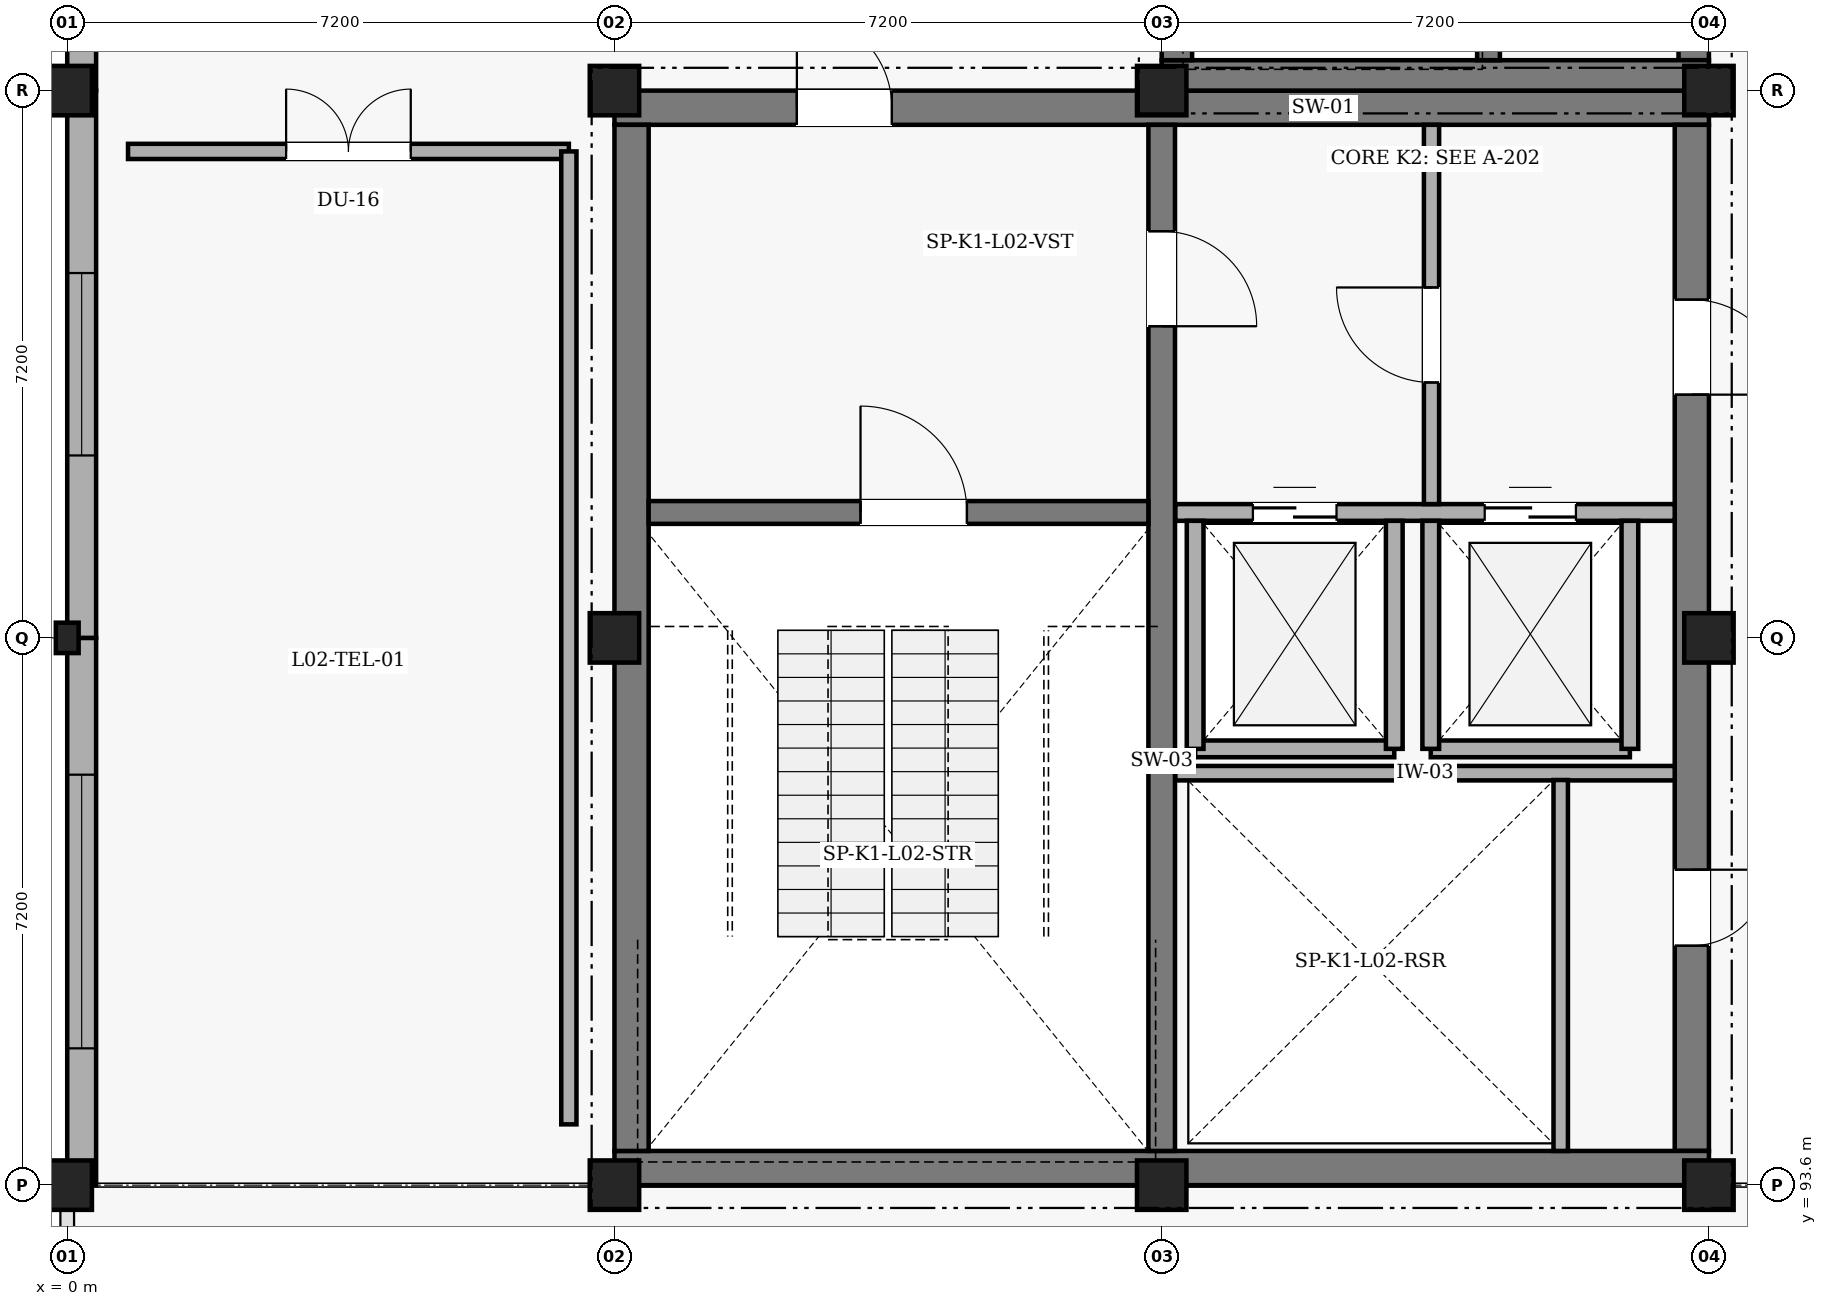
"""IFC4 building model, lengths in metres.
Left out: names, types, materials, properties, quantities, classifications, styles, units other than length and angle.
Written with IfcOpenShell. Run it as: python <this file> out.ifc"""

import sys

from ifc_helpers import new_model, si_unit, direction, frame, frame_2d, origin, origin_2d, place, context, subcontext, project, spatial, rectangle, extrude, element, fill, save


model = new_model("IFC4")
c1 = context("Model", 3, precision=1e-05, world=origin(), true_north=direction((0.0, 1.0)))
c2 = subcontext(c1, "Body", "Model", "MODEL_VIEW")
j1 = project(units=[si_unit("LENGTHUNIT", "METRE"), si_unit("PLANEANGLEUNIT", "RADIAN")], contexts=[c1])
p1 = place(None, origin())
s1 = spatial("IfcSite", under=j1, at=p1, CompositionType="ELEMENT")
p2 = place(p1, origin())
s2 = spatial("IfcBuilding", under=s1, at=p2, CompositionType="ELEMENT")
p3 = place(p2, frame((0.0, 0.0, 9.6)))
s3 = spatial("IfcBuildingStorey", under=s2, at=p3, CompositionType="ELEMENT", Elevation=9.6)
p4 = place(p3, frame((7.2, 107.775, 0.0), z_axis=(0.0, 0.0, 1.0), x_axis=(1.0, 0.0, 0.0)))
e1 = element("IfcWall", 1, at=p4, inside=s3, PredefinedType="SHEAR", context=c2, shape_type="SweptSolid", body=[
    extrude(rectangle(XDim=14.4, YDim=0.45, at=frame_2d((7.2, 0.0))), origin(), (0.0, 0.0, 1.0), 4.2),
])
p5 = place(p4, frame((2.4, 0.0, 0.0)))
e2 = element("IfcOpeningElement", 2, at=p5, cuts=e1, PredefinedType="OPENING", context=c2, shape_type="SweptSolid", body=[
    extrude(rectangle(XDim=1.25, YDim=2.2, at=frame_2d((0.625, 1.1))), frame((0.0, 0.235, 0.0), z_axis=(0.0, -1.0, 0.0), x_axis=(1.0, 0.0, 0.0)), (0.0, 0.0, 1.0), 0.47),
])
p6 = place(p3, frame((21.375, 107.55, 0.0), z_axis=(0.0, 0.0, 1.0), x_axis=(0.0, -1.0, 0.0)))
e3 = element("IfcWall", 3, at=p6, inside=s3, PredefinedType="SHEAR", context=c2, shape_type="SweptSolid", body=[
    extrude(rectangle(XDim=13.5, YDim=0.45, at=frame_2d((6.75, 0.0))), origin(), (0.0, 0.0, 1.0), 4.2),
])
p7 = place(p6, frame((9.8, 0.0, 0.0)))
e4 = element("IfcOpeningElement", 4, at=p7, cuts=e3, PredefinedType="OPENING", context=c2, shape_type="SweptSolid", body=[
    extrude(rectangle(XDim=1.0, YDim=2.15, at=frame_2d((0.5, 1.075))), frame((0.0, 0.235, 0.0), z_axis=(0.0, -1.0, 0.0), x_axis=(1.0, 0.0, 0.0)), (0.0, 0.0, 1.0), 0.47),
])
p8 = place(p6, frame((2.3, 0.0, 0.0)))
e5 = element("IfcOpeningElement", 5, at=p8, cuts=e3, PredefinedType="OPENING", context=c2, shape_type="SweptSolid", body=[
    extrude(rectangle(XDim=1.25, YDim=2.2, at=frame_2d((0.625, 1.1))), frame((0.0, 0.235, 0.0), z_axis=(0.0, -1.0, 0.0), x_axis=(1.0, 0.0, 0.0)), (0.0, 0.0, 1.0), 0.47),
])
p9 = place(p3, frame((21.6, 93.825, 0.0), z_axis=(0.0, 0.0, 1.0), x_axis=(-1.0, 0.0, 0.0)))
e6 = element("IfcWall", 6, at=p9, inside=s3, PredefinedType="SHEAR", context=c2, shape_type="SweptSolid", body=[
    extrude(rectangle(XDim=14.4, YDim=0.45, at=frame_2d((7.2, 0.0))), origin(), (0.0, 0.0, 1.0), 4.2),
])
p10 = place(p3, frame((7.425, 94.05, 0.0), z_axis=(0.0, 0.0, 1.0), x_axis=(0.0, 1.0, 0.0)))
e7 = element("IfcWall", 7, at=p10, inside=s3, PredefinedType="SHEAR", context=c2, shape_type="SweptSolid", body=[
    extrude(rectangle(XDim=13.5, YDim=0.45, at=frame_2d((6.75, 0.0))), origin(), (0.0, 0.0, 1.0), 4.2),
])
p11 = place(p3, frame((14.4, 107.55, 0.0), z_axis=(0.0, 0.0, 1.0), x_axis=(0.0, -1.0, 0.0)))
e8 = element("IfcWall", 8, at=p11, inside=s3, PredefinedType="SHEAR", context=c2, shape_type="SweptSolid", body=[
    extrude(rectangle(XDim=13.5, YDim=0.35, at=frame_2d((6.75, 0.0))), origin(), (0.0, 0.0, 1.0), 4.2),
])
p12 = place(p11, frame((1.4, 0.0, 0.0)))
e9 = element("IfcOpeningElement", 9, at=p12, cuts=e8, PredefinedType="OPENING", context=c2, shape_type="SweptSolid", body=[
    extrude(rectangle(XDim=1.25, YDim=2.2, at=frame_2d((0.625, 1.1))), frame((0.0, 0.185, 0.0), z_axis=(0.0, -1.0, 0.0), x_axis=(1.0, 0.0, 0.0)), (0.0, 0.0, 1.0), 0.37),
])
p13 = place(p3, frame((7.65, 102.45, 0.0), z_axis=(0.0, 0.0, 1.0), x_axis=(1.0, 0.0, 0.0)))
e10 = element("IfcWall", 10, at=p13, inside=s3, PredefinedType="SHEAR", context=c2, shape_type="SweptSolid", body=[
    extrude(rectangle(XDim=6.575, YDim=0.3, at=frame_2d((3.288, 0.0))), origin(), (0.0, 0.0, 1.0), 4.2),
])
p14 = place(p13, frame((2.788, 0.0, 0.0)))
e11 = element("IfcOpeningElement", 11, at=p14, cuts=e10, PredefinedType="OPENING", context=c2, shape_type="SweptSolid", body=[
    extrude(rectangle(XDim=1.4, YDim=2.2, at=frame_2d((0.7, 1.1))), frame((0.0, 0.16, 0.0), z_axis=(0.0, -1.0, 0.0), x_axis=(1.0, 0.0, 0.0)), (0.0, 0.0, 1.0), 0.32),
])
p15 = place(p3, frame((21.4, 122.0, 0.0), z_axis=(0.0, 0.0, 1.0), x_axis=(0.0, -1.0, 0.0)))
e12 = element("IfcWall", 12, at=p15, inside=s3, PredefinedType="SHEAR", context=c2, shape_type="SweptSolid", body=[
    extrude(rectangle(XDim=13.6, YDim=0.4, at=frame_2d((6.8, 0.0))), origin(), (0.0, 0.0, 1.0), 4.2),
])
p16 = place(p15, frame((2.3, 0.0, 0.0)))
e13 = element("IfcOpeningElement", 13, at=p16, cuts=e12, PredefinedType="OPENING", context=c2, shape_type="SweptSolid", body=[
    extrude(rectangle(XDim=1.25, YDim=2.2, at=frame_2d((0.625, 1.1))), frame((0.0, 0.21, 0.0), z_axis=(0.0, -1.0, 0.0), x_axis=(1.0, 0.0, 0.0)), (0.0, 0.0, 1.0), 0.42),
])
p17 = place(p3, frame((21.6, 108.2, 0.0), z_axis=(0.0, 0.0, 1.0), x_axis=(-1.0, 0.0, 0.0)))
e14 = element("IfcWall", 14, at=p17, inside=s3, PredefinedType="SHEAR", context=c2, shape_type="SweptSolid", body=[
    extrude(rectangle(XDim=7.2, YDim=0.4, at=frame_2d((3.6, 0.0))), origin(), (0.0, 0.0, 1.0), 4.2),
])
p18 = place(p3, frame((14.6, 108.4, 0.0), z_axis=(0.0, 0.0, 1.0), x_axis=(0.0, 1.0, 0.0)))
e15 = element("IfcWall", 15, at=p18, inside=s3, PredefinedType="SHEAR", context=c2, shape_type="SweptSolid", body=[
    extrude(rectangle(XDim=13.6, YDim=0.4, at=frame_2d((6.8, 0.0))), origin(), (0.0, 0.0, 1.0), 4.2),
])
p19 = place(p18, frame((9.8, 0.0, 0.0)))
e16 = element("IfcOpeningElement", 16, at=p19, cuts=e15, PredefinedType="OPENING", context=c2, shape_type="SweptSolid", body=[
    extrude(rectangle(XDim=1.25, YDim=2.2, at=frame_2d((0.625, 1.1))), frame((0.0, 0.21, 0.0), z_axis=(0.0, -1.0, 0.0), x_axis=(1.0, 0.0, 0.0)), (0.0, 0.0, 1.0), 0.42),
])
p20 = place(p3, frame((18.7, 116.7, 0.0), z_axis=(0.0, 0.0, 1.0), x_axis=(0.0, -1.0, 0.0)))
e17 = element("IfcWall", 17, at=p20, inside=s3, PredefinedType="SHEAR", context=c2, shape_type="SweptSolid", body=[
    extrude(rectangle(XDim=8.3, YDim=0.3, at=frame_2d((4.15, 0.0))), origin(), (0.0, 0.0, 1.0), 4.2),
])
p21 = place(p3, frame((0.0, 93.6, 0.0), z_axis=(0.0, 0.0, 1.0), x_axis=(0.0, 1.0, 0.0)))
e18 = element("IfcColumn", 18, at=p21, inside=s3, PredefinedType="COLUMN", context=c2, shape_type="SweptSolid", body=[
    extrude(rectangle(XDim=0.65, YDim=0.65, at=origin_2d()), origin(), (0.0, 0.0, 1.0), 3.88),
])
p22 = place(p3, frame((0.0, 100.8, 0.0), z_axis=(0.0, 0.0, 1.0), x_axis=(1.0, 0.0, 0.0)))
e19 = element("IfcColumn", 19, at=p22, inside=s3, PredefinedType="PILASTER", context=c2, shape_type="SweptSolid", body=[
    extrude(rectangle(XDim=0.3, YDim=0.4, at=origin_2d()), origin(), (0.0, 0.0, 1.0), 3.88),
])
for number, where, z_axis, x_axis in (
    (20, (0.0, 108.0, 0.0), (0.0, 0.0, 1.0), (1.0, 0.0, 0.0)),
    (21, (7.2, 93.6, 0.0), (0.0, 0.0, 1.0), (1.0, 0.0, 0.0)),
    (22, (7.2, 100.8, 0.0), (0.0, 0.0, 1.0), (1.0, 0.0, 0.0)),
    (23, (7.2, 108.0, 0.0), (0.0, 0.0, 1.0), (1.0, 0.0, 0.0)),
    (24, (14.4, 93.6, 0.0), (0.0, 0.0, 1.0), (1.0, 0.0, 0.0)),
    (25, (14.4, 108.0, 0.0), (0.0, 0.0, 1.0), (1.0, 0.0, 0.0)),
    (26, (21.6, 93.6, 0.0), (0.0, 0.0, 1.0), (1.0, 0.0, 0.0)),
    (27, (21.6, 100.8, 0.0), (0.0, 0.0, 1.0), (1.0, 0.0, 0.0)),
    (28, (21.6, 108.0, 0.0), (0.0, 0.0, 1.0), (1.0, 0.0, 0.0)),
):
    element("IfcColumn", number, at=place(p3, frame(where, z_axis=z_axis, x_axis=x_axis)), inside=s3, PredefinedType="COLUMN", context=c2, shape_type="SweptSolid", body=[
        extrude(rectangle(XDim=0.65, YDim=0.65, at=origin_2d()), origin(), (0.0, 0.0, 1.0), 3.88),
    ])
p23 = place(p3, frame((0.19, 93.6, 0.0), z_axis=(0.0, 0.0, 1.0), x_axis=(0.0, 1.0, 0.0)))
e29 = element("IfcWall", 29, at=p23, inside=s3, PredefinedType="SOLIDWALL", context=c2, shape_type="SweptSolid", body=[
    extrude(rectangle(XDim=7.2, YDim=0.38, at=frame_2d((3.6, 0.0))), origin(), (0.0, 0.0, 1.0), 3.58),
])
p24 = place(p23, frame((1.8, 0.0, 0.9)))
e30 = element("IfcOpeningElement", 30, at=p24, cuts=e29, PredefinedType="OPENING", context=c2, shape_type="SweptSolid", body=[
    extrude(rectangle(XDim=3.6, YDim=1.1, at=frame_2d((1.8, 0.55))), frame((0.0, 0.2, 0.0), z_axis=(0.0, -1.0, 0.0), x_axis=(1.0, 0.0, 0.0)), (0.0, 0.0, 1.0), 0.4),
])
p25 = place(p3, frame((0.19, 100.8, 0.0), z_axis=(0.0, 0.0, 1.0), x_axis=(0.0, 1.0, 0.0)))
e31 = element("IfcWall", 31, at=p25, inside=s3, PredefinedType="SOLIDWALL", context=c2, shape_type="SweptSolid", body=[
    extrude(rectangle(XDim=7.2, YDim=0.38, at=frame_2d((3.6, 0.0))), origin(), (0.0, 0.0, 1.0), 3.58),
])
p26 = place(p25, frame((2.4, 0.0, 0.9)))
e32 = element("IfcOpeningElement", 32, at=p26, cuts=e31, PredefinedType="OPENING", context=c2, shape_type="SweptSolid", body=[
    extrude(rectangle(XDim=2.4, YDim=1.0, at=frame_2d((1.2, 0.5))), frame((0.0, 0.2, 0.0), z_axis=(0.0, -1.0, 0.0), x_axis=(1.0, 0.0, 0.0)), (0.0, 0.0, 1.0), 0.4),
])
p27 = place(p3, frame((0.19, 108.0, 0.0), z_axis=(0.0, 0.0, 1.0), x_axis=(0.0, 1.0, 0.0)))
e33 = element("IfcWall", 33, at=p27, inside=s3, PredefinedType="SOLIDWALL", context=c2, shape_type="SweptSolid", body=[
    extrude(rectangle(XDim=7.2, YDim=0.38, at=frame_2d((3.6, 0.0))), origin(), (0.0, 0.0, 1.0), 3.58),
])
p28 = place(p27, frame((2.55, 0.0, 0.9)))
e34 = element("IfcOpeningElement", 34, at=p28, cuts=e33, PredefinedType="OPENING", context=c2, shape_type="SweptSolid", body=[
    extrude(rectangle(XDim=2.1, YDim=1.8, at=frame_2d((1.05, 0.9))), frame((0.0, 0.2, 0.0), z_axis=(0.0, -1.0, 0.0), x_axis=(1.0, 0.0, 0.0)), (0.0, 0.0, 1.0), 0.4),
])
p29 = place(p3, frame((14.58, 99.02, 0.0), z_axis=(0.0, 0.0, 1.0), x_axis=(1.0, 0.0, 0.0)))
e35 = element("IfcWall", 35, at=p29, inside=s3, PredefinedType="PARTITIONING", context=c2, shape_type="SweptSolid", body=[
    extrude(rectangle(XDim=6.57, YDim=0.19, at=frame_2d((3.285, 0.0))), origin(), (0.0, 0.0, 1.0), 3.85),
])
p30 = place(p3, frame((19.65, 94.05, 0.0), z_axis=(0.0, 0.0, 1.0), x_axis=(0.0, 1.0, 0.0)))
e36 = element("IfcWall", 36, at=p30, inside=s3, PredefinedType="PARTITIONING", context=c2, shape_type="SweptSolid", body=[
    extrude(rectangle(XDim=4.88, YDim=0.19, at=frame_2d((2.44, 0.0))), origin(), (0.0, 0.0, 1.0), 3.85),
])
p31 = place(p3, frame((14.58, 102.45, 0.0), z_axis=(0.0, 0.0, 1.0), x_axis=(1.0, 0.0, 0.0)))
e37 = element("IfcWall", 37, at=p31, inside=s3, PredefinedType="PARTITIONING", context=c2, shape_type="SweptSolid", body=[
    extrude(rectangle(XDim=6.57, YDim=0.22, at=frame_2d((3.285, 0.0))), origin(), (0.0, 0.0, 1.0), 3.85),
])
p32 = place(p31, frame((1.02, 0.0, 0.0)))
e38 = element("IfcOpeningElement", 38, at=p32, cuts=e37, PredefinedType="OPENING", context=c2, shape_type="SweptSolid", body=[
    extrude(rectangle(XDim=1.1, YDim=2.15, at=frame_2d((0.55, 1.075))), frame((0.0, 0.12, 0.0), z_axis=(0.0, -1.0, 0.0), x_axis=(1.0, 0.0, 0.0)), (0.0, 0.0, 1.0), 0.24),
])
p33 = place(p31, frame((4.07, 0.0, 0.0)))
e39 = element("IfcOpeningElement", 39, at=p33, cuts=e37, PredefinedType="OPENING", context=c2, shape_type="SweptSolid", body=[
    extrude(rectangle(XDim=1.2, YDim=2.15, at=frame_2d((0.6, 1.075))), frame((0.0, 0.12, 0.0), z_axis=(0.0, -1.0, 0.0), x_axis=(1.0, 0.0, 0.0)), (0.0, 0.0, 1.0), 0.24),
])
p34 = place(p3, frame((14.84, 99.34, 0.0), z_axis=(0.0, 0.0, 1.0), x_axis=(1.0, 0.0, 0.0)))
e40 = element("IfcWall", 40, at=p34, inside=s3, PredefinedType="PARTITIONING", context=c2, shape_type="SweptSolid", body=[
    extrude(rectangle(XDim=2.62, YDim=0.22, at=frame_2d((1.31, 0.0))), origin(), (0.0, 0.0, 1.0), 3.85),
])
for number, where, z_axis, x_axis in (
    (41, (14.84, 99.34, 0.0), (0.0, 0.0, 1.0), (0.0, 1.0, 0.0)),
    (42, (17.46, 99.34, 0.0), (0.0, 0.0, 1.0), (0.0, 1.0, 0.0)),
):
    element("IfcWall", number, at=place(p3, frame(where, z_axis=z_axis, x_axis=x_axis)), inside=s3, PredefinedType="PARTITIONING", context=c2, shape_type="SweptSolid", body=[
        extrude(rectangle(XDim=3.0, YDim=0.22, at=frame_2d((1.5, 0.0))), origin(), (0.0, 0.0, 1.0), 3.85),
    ])
p35 = place(p3, frame((17.94, 99.34, 0.0), z_axis=(0.0, 0.0, 1.0), x_axis=(1.0, 0.0, 0.0)))
e43 = element("IfcWall", 43, at=p35, inside=s3, PredefinedType="PARTITIONING", context=c2, shape_type="SweptSolid", body=[
    extrude(rectangle(XDim=2.62, YDim=0.22, at=frame_2d((1.31, 0.0))), origin(), (0.0, 0.0, 1.0), 3.85),
])
for number, where, z_axis, x_axis in (
    (44, (17.94, 99.34, 0.0), (0.0, 0.0, 1.0), (0.0, 1.0, 0.0)),
    (45, (20.56, 99.34, 0.0), (0.0, 0.0, 1.0), (0.0, 1.0, 0.0)),
):
    element("IfcWall", number, at=place(p3, frame(where, z_axis=z_axis, x_axis=x_axis)), inside=s3, PredefinedType="PARTITIONING", context=c2, shape_type="SweptSolid", body=[
        extrude(rectangle(XDim=3.0, YDim=0.22, at=frame_2d((1.5, 0.0))), origin(), (0.0, 0.0, 1.0), 3.85),
    ])
p36 = place(p3, frame((17.95, 102.56, 0.0), z_axis=(0.0, 0.0, 1.0), x_axis=(0.0, 1.0, 0.0)))
e46 = element("IfcWall", 46, at=p36, inside=s3, PredefinedType="PARTITIONING", context=c2, shape_type="SweptSolid", body=[
    extrude(rectangle(XDim=4.99, YDim=0.2, at=frame_2d((2.495, 0.0))), origin(), (0.0, 0.0, 1.0), 3.85),
])
p37 = place(p36, frame((1.6, 0.0, 0.0)))
e47 = element("IfcOpeningElement", 47, at=p37, cuts=e46, PredefinedType="OPENING", context=c2, shape_type="SweptSolid", body=[
    extrude(rectangle(XDim=1.25, YDim=2.2, at=frame_2d((0.625, 1.1))), frame((0.0, 0.11, 0.0), z_axis=(0.0, -1.0, 0.0), x_axis=(1.0, 0.0, 0.0)), (0.0, 0.0, 1.0), 0.22),
])
p38 = place(p3, frame((0.8, 107.2, 0.0), z_axis=(0.0, 0.0, 1.0), x_axis=(1.0, 0.0, 0.0)))
e48 = element("IfcWall", 48, at=p38, inside=s3, PredefinedType="PARTITIONING", context=c2, shape_type="SweptSolid", body=[
    extrude(rectangle(XDim=5.8, YDim=0.2, at=frame_2d((2.9, 0.0))), origin(), (0.0, 0.0, 1.0), 3.85),
])
p39 = place(p38, frame((2.08, 0.0, 0.0)))
e49 = element("IfcOpeningElement", 49, at=p39, cuts=e48, PredefinedType="OPENING", context=c2, shape_type="SweptSolid", body=[
    extrude(rectangle(XDim=1.64, YDim=2.2, at=frame_2d((0.82, 1.1))), frame((0.0, 0.11, 0.0), z_axis=(0.0, -1.0, 0.0), x_axis=(1.0, 0.0, 0.0)), (0.0, 0.0, 1.0), 0.22),
])
p40 = place(p3, frame((6.6, 107.2, 0.0), z_axis=(0.0, 0.0, 1.0), x_axis=(0.0, -1.0, 0.0)))
e50 = element("IfcWall", 50, at=p40, inside=s3, PredefinedType="PARTITIONING", context=c2, shape_type="SweptSolid", body=[
    extrude(rectangle(XDim=12.8, YDim=0.2, at=frame_2d((6.4, 0.0))), origin(), (0.0, 0.0, 1.0), 3.43),
])
p41 = place(p24, origin())
e51 = element("IfcWindow", 51, at=p41, inside=s3, PartitioningType="SINGLE_PANEL", PredefinedType="WINDOW", context=c2, shape_type="SweptSolid", body=[
    extrude(rectangle(XDim=3.6, YDim=1.1, at=frame_2d((1.8, 0.55))), frame((0.0, 0.03, 0.0), z_axis=(0.0, -1.0, 0.0), x_axis=(1.0, 0.0, 0.0)), (0.0, 0.0, 1.0), 0.06),
])
fill(e30, e51)
p42 = place(p26, origin())
e52 = element("IfcWindow", 52, at=p42, inside=s3, PartitioningType="SINGLE_PANEL", PredefinedType="WINDOW", context=c2, shape_type="SweptSolid", body=[
    extrude(rectangle(XDim=2.4, YDim=1.0, at=frame_2d((1.2, 0.5))), frame((0.0, 0.03, 0.0), z_axis=(0.0, -1.0, 0.0), x_axis=(1.0, 0.0, 0.0)), (0.0, 0.0, 1.0), 0.06),
])
fill(e32, e52)
p43 = place(p14, origin())
e53 = element("IfcDoor", 53, at=p43, inside=s3, OperationType="SINGLE_SWING_LEFT", PredefinedType="DOOR", context=c2, shape_type="SweptSolid", body=[
    extrude(rectangle(XDim=1.4, YDim=2.2, at=frame_2d((0.7, 1.1))), frame((0.0, 0.025, 0.0), z_axis=(0.0, -1.0, 0.0), x_axis=(1.0, 0.0, 0.0)), (0.0, 0.0, 1.0), 0.05),
])
fill(e11, e53)
p44 = place(p12, origin())
e54 = element("IfcDoor", 54, at=p44, inside=s3, OperationType="SINGLE_SWING_RIGHT", PredefinedType="DOOR", context=c2, shape_type="SweptSolid", body=[
    extrude(rectangle(XDim=1.25, YDim=2.2, at=frame_2d((0.625, 1.1))), frame((0.0, 0.025, 0.0), z_axis=(0.0, -1.0, 0.0), x_axis=(1.0, 0.0, 0.0)), (0.0, 0.0, 1.0), 0.05),
])
fill(e9, e54)
p45 = place(p7, origin())
e55 = element("IfcDoor", 55, at=p45, inside=s3, OperationType="SINGLE_SWING_LEFT", PredefinedType="DOOR", context=c2, shape_type="SweptSolid", body=[
    extrude(rectangle(XDim=1.0, YDim=2.15, at=frame_2d((0.5, 1.075))), frame((0.0, 0.025, 0.0), z_axis=(0.0, -1.0, 0.0), x_axis=(1.0, 0.0, 0.0)), (0.0, 0.0, 1.0), 0.05),
])
fill(e4, e55)
p46 = place(p32, origin())
e56 = element("IfcDoor", 56, at=p46, inside=s3, OperationType="DOUBLE_DOOR_SLIDING", PredefinedType="DOOR", context=c2, shape_type="SweptSolid", body=[
    extrude(rectangle(XDim=1.1, YDim=2.15, at=frame_2d((0.55, 1.075))), frame((0.0, 0.025, 0.0), z_axis=(0.0, -1.0, 0.0), x_axis=(1.0, 0.0, 0.0)), (0.0, 0.0, 1.0), 0.05),
])
fill(e38, e56)
p47 = place(p33, origin())
e57 = element("IfcDoor", 57, at=p47, inside=s3, OperationType="DOUBLE_DOOR_SLIDING", PredefinedType="DOOR", context=c2, shape_type="SweptSolid", body=[
    extrude(rectangle(XDim=1.2, YDim=2.15, at=frame_2d((0.6, 1.075))), frame((0.0, 0.025, 0.0), z_axis=(0.0, -1.0, 0.0), x_axis=(1.0, 0.0, 0.0)), (0.0, 0.0, 1.0), 0.05),
])
fill(e39, e57)
p48 = place(p37, origin())
e58 = element("IfcDoor", 58, at=p48, inside=s3, OperationType="SINGLE_SWING_RIGHT", PredefinedType="DOOR", context=c2, shape_type="SweptSolid", body=[
    extrude(rectangle(XDim=1.25, YDim=2.2, at=frame_2d((0.625, 1.1))), frame((0.0, 0.025, 0.0), z_axis=(0.0, -1.0, 0.0), x_axis=(1.0, 0.0, 0.0)), (0.0, 0.0, 1.0), 0.05),
])
fill(e47, e58)
p49 = place(p5, origin())
e59 = element("IfcDoor", 59, at=p49, inside=s3, OperationType="SINGLE_SWING_LEFT", PredefinedType="DOOR", context=c2, shape_type="SweptSolid", body=[
    extrude(rectangle(XDim=1.25, YDim=2.2, at=frame_2d((0.625, 1.1))), frame((0.0, 0.025, 0.0), z_axis=(0.0, -1.0, 0.0), x_axis=(1.0, 0.0, 0.0)), (0.0, 0.0, 1.0), 0.05),
])
fill(e2, e59)
p50 = place(p8, origin())
e60 = element("IfcDoor", 60, at=p50, inside=s3, OperationType="SINGLE_SWING_RIGHT", PredefinedType="DOOR", context=c2, shape_type="SweptSolid", body=[
    extrude(rectangle(XDim=1.25, YDim=2.2, at=frame_2d((0.625, 1.1))), frame((0.0, 0.025, 0.0), z_axis=(0.0, -1.0, 0.0), x_axis=(1.0, 0.0, 0.0)), (0.0, 0.0, 1.0), 0.05),
])
fill(e5, e60)
p51 = place(p39, origin())
e61 = element("IfcDoor", 61, at=p51, inside=s3, OperationType="DOUBLE_DOOR_SINGLE_SWING", PredefinedType="DOOR", context=c2, shape_type="SweptSolid", body=[
    extrude(rectangle(XDim=1.64, YDim=2.2, at=frame_2d((0.82, 1.1))), frame((0.0, 0.025, 0.0), z_axis=(0.0, -1.0, 0.0), x_axis=(1.0, 0.0, 0.0)), (0.0, 0.0, 1.0), 0.05),
])
fill(e49, e61)
save(model, sys.argv[1])
